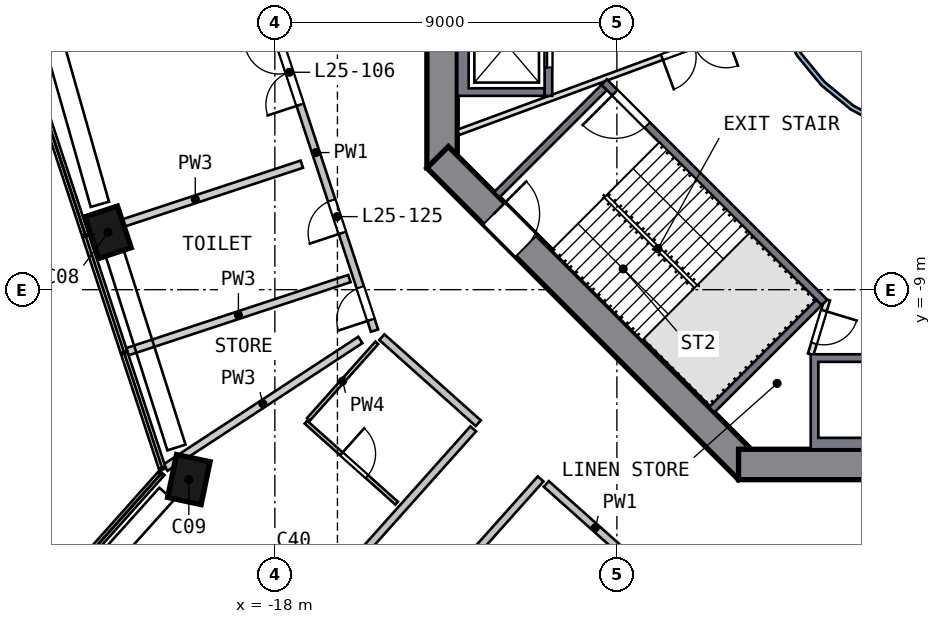
"""IFC4 building model, lengths in metres.
Left out: names, types, materials, properties, quantities, classifications, styles, units other than length and angle.
Written with IfcOpenShell. Run it as: python <this file> out.ifc"""

import sys

from ifc_helpers import new_model, si_unit, direction, frame, frame_2d, origin, origin_2d, place, context, subcontext, project, spatial, polyline, rectangle, outline, extrude, element, fill, save


model = new_model("IFC4")
c1 = context("Model", 3, precision=1e-05, world=origin(), true_north=direction((0.0, 1.0)))
c2 = subcontext(c1, "Body", "Model", "MODEL_VIEW")
j1 = project(units=[si_unit("LENGTHUNIT", "METRE"), si_unit("PLANEANGLEUNIT", "RADIAN")], contexts=[c1])
p1 = place(None, origin())
s1 = spatial("IfcSite", under=j1, at=p1, CompositionType="ELEMENT")
p2 = place(p1, origin())
s2 = spatial("IfcBuilding", under=s1, at=p2, CompositionType="ELEMENT")
p3 = place(p2, frame((0.0, 0.0, 107.0)))
s3 = spatial("IfcBuildingStorey", under=s2, at=p3, CompositionType="ELEMENT", Elevation=107.0)
p4 = place(p3, frame((-22.422, -7.389, 0.0), z_axis=(0.02809349, -0.08294545, 0.996158024), x_axis=(0.311587523, -0.946173645, -0.087570825)))
e1 = element("IfcColumn", 1, at=p4, inside=s3, PredefinedType="COLUMN", context=c2, shape_type="SweptSolid", body=[
    extrude(rectangle(XDim=1.15, YDim=0.9, at=origin_2d()), origin(), (0.0, 0.0, 1.0), 4.206),
])
p5 = place(p3, frame((-20.327, -13.907, 0.0), z_axis=(0.052164469, -0.074910267, 0.995824944), x_axis=(0.207629407, 0.97620516, 0.062558095)))
e2 = element("IfcColumn", 2, at=p5, inside=s3, PredefinedType="COLUMN", context=c2, shape_type="SweptSolid", body=[
    extrude(rectangle(XDim=1.15, YDim=0.9, at=origin_2d()), origin(), (0.0, 0.0, 1.0), 4.208),
])
p6 = place(p3, frame((-13.6, 5.799, 0.0), z_axis=(0.0, 0.0, 1.0), x_axis=(0.0, -1.0, 0.0)))
e3 = element("IfcWall", 3, at=p6, inside=s3, PredefinedType="SHEAR", context=c2, shape_type="SweptSolid", body=[
    extrude(rectangle(XDim=11.598, YDim=0.8, at=frame_2d((5.799, 0.0))), origin(), (0.0, 0.0, 1.0), 4.5),
])
p7 = place(p6, frame((4.899, 0.0, 0.0)))
e4 = element("IfcOpeningElement", 4, at=p7, cuts=e3, PredefinedType="OPENING", context=c2, shape_type="SweptSolid", body=[
    extrude(rectangle(XDim=1.8, YDim=2.1, at=frame_2d((0.9, 1.05))), frame((0.0, 0.41, 0.0), z_axis=(0.0, -1.0, 0.0), x_axis=(1.0, 0.0, 0.0)), (0.0, 0.0, 1.0), 0.82),
])
p8 = place(p3, frame((-13.717, -5.516, 0.0), z_axis=(0.0, 0.0, 1.0), x_axis=(0.707106781, -0.707106781, 0.0)))
e5 = element("IfcWall", 5, at=p8, inside=s3, PredefinedType="SHEAR", context=c2, shape_type="SweptSolid", body=[
    extrude(rectangle(XDim=11.598, YDim=0.8, at=frame_2d((5.799, 0.0))), origin(), (0.0, 0.0, 1.0), 4.5),
])
p9 = place(p8, frame((2.099, 0.0, 0.0)))
e6 = element("IfcOpeningElement", 6, at=p9, cuts=e5, PredefinedType="OPENING", context=c2, shape_type="SweptSolid", body=[
    extrude(rectangle(XDim=1.2, YDim=2.1, at=frame_2d((0.6, 1.05))), frame((0.0, 0.41, 0.0), z_axis=(0.0, -1.0, 0.0), x_axis=(1.0, 0.0, 0.0)), (0.0, 0.0, 1.0), 0.82),
])
p10 = place(p3, frame((-5.799, -13.6, 0.0), z_axis=(0.0, 0.0, 1.0), x_axis=(1.0, 0.0, 0.0)))
e7 = element("IfcWall", 7, at=p10, inside=s3, PredefinedType="SHEAR", context=c2, shape_type="SweptSolid", body=[
    extrude(rectangle(XDim=11.598, YDim=0.8, at=frame_2d((5.799, 0.0))), origin(), (0.0, 0.0, 1.0), 4.5),
])
p11 = place(p10, frame((4.899, 0.0, 0.0)))
e8 = element("IfcOpeningElement", 8, at=p11, cuts=e7, PredefinedType="OPENING", context=c2, shape_type="SweptSolid", body=[
    extrude(rectangle(XDim=1.8, YDim=2.1, at=frame_2d((0.9, 1.05))), frame((0.0, 0.41, 0.0), z_axis=(0.0, -1.0, 0.0), x_axis=(1.0, 0.0, 0.0)), (0.0, 0.0, 1.0), 0.82),
])
p12 = place(p3, origin())
e9 = element("IfcWall", 9, at=p12, inside=s3, PredefinedType="SOLIDWALL", context=c2, shape_type="SweptSolid", body=[
    extrude(outline(polyline([(-13.2, -3.9), (-13.2, -1.2), (-10.9, -1.2), (-10.9, -1.4), (-12.9, -1.4), (-12.9, -3.7), (-10.9, -3.7), (-10.9, -3.9), (-13.2, -3.9)])), origin(), (0.0, 0.0, 1.0), 4.19),
])
p13 = place(p3, frame((-10.8, -1.2, 0.0), z_axis=(0.0, 0.0, 1.0), x_axis=(0.0, -1.0, 0.0)))
e10 = element("IfcWall", 10, at=p13, inside=s3, PredefinedType="SOLIDWALL", context=c2, shape_type="SweptSolid", body=[
    extrude(rectangle(XDim=2.7, YDim=0.2, at=frame_2d((1.35, 0.0))), origin(), (0.0, 0.0, 1.0), 4.19),
])
p14 = place(p13, frame((0.75, 0.0, 0.0)))
e11 = element("IfcOpeningElement", 11, at=p14, cuts=e10, PredefinedType="OPENING", context=c2, shape_type="SweptSolid", body=[
    extrude(rectangle(XDim=1.2, YDim=2.1, at=frame_2d((0.6, 1.05))), frame((0.0, 0.11, 0.0), z_axis=(0.0, -1.0, 0.0), x_axis=(1.0, 0.0, 0.0)), (0.0, 0.0, 1.0), 0.22),
])
p15 = place(p3, origin())
e12 = element("IfcWall", 12, at=p15, inside=s3, PredefinedType="SOLIDWALL", context=c2, shape_type="SweptSolid", body=[
    extrude(outline(polyline([(-1.2, -13.2), (-3.9, -13.2), (-3.9, -10.7), (-1.2, -10.7), (-1.2, -13.2)]), holes=[polyline([(-3.7, -10.9), (-3.7, -12.9), (-1.4, -12.9), (-1.4, -10.9), (-3.7, -10.9)])]), origin(), (0.0, 0.0, 1.0), 4.19),
])
p16 = place(p3, frame((-3.535, -9.334, 0.0), z_axis=(0.0, 0.0, 1.0), x_axis=(-0.707106781, 0.707106781, 0.0)))
e13 = element("IfcWall", 13, at=p16, inside=s3, PredefinedType="SOLIDWALL", context=c2, shape_type="SweptSolid", body=[
    extrude(rectangle(XDim=8.2, YDim=0.2, at=frame_2d((4.1, 0.0))), origin(), (0.0, 0.0, 1.0), 4.19),
])
p17 = place(p16, frame((6.6, 0.0, 0.0)))
e14 = element("IfcOpeningElement", 14, at=p17, cuts=e13, PredefinedType="OPENING", context=c2, shape_type="SweptSolid", body=[
    extrude(rectangle(XDim=1.2, YDim=2.1, at=frame_2d((0.6, 1.05))), frame((0.0, 0.11, 0.0), z_axis=(0.0, -1.0, 0.0), x_axis=(1.0, 0.0, 0.0)), (0.0, 0.0, 1.0), 0.22),
])
for number, where, z_axis, x_axis in (
    (15, (-9.334, -3.677, 0.0), (0.0, 0.0, 1.0), (-0.707, -0.707, 0.0)),
    (16, (-3.677, -9.334, 0.0), (0.0, 0.0, 1.0), (-0.707, -0.707, 0.0)),
):
    element("IfcWall", number, at=place(p3, frame(where, z_axis=z_axis, x_axis=x_axis)), inside=s3, PredefinedType="SOLIDWALL", context=c2, shape_type="SweptSolid", body=[
        extrude(rectangle(XDim=4.0, YDim=0.2, at=frame_2d((2.0, 0.0))), origin(), (0.0, 0.0, 1.0), 4.19),
    ])
p18 = place(p3, frame((-3.465, -9.263, 0.0), z_axis=(0.0, 0.0, 1.0), x_axis=(-0.289808785, -0.957084567, 0.0)))
e17 = element("IfcWall", 17, at=p18, inside=s3, PredefinedType="PARTITIONING", context=c2, shape_type="SweptSolid", body=[
    extrude(rectangle(XDim=1.501, YDim=0.15, at=frame_2d((0.75, 0.0))), origin(), (0.0, 0.0, 1.0), 4.19),
])
p19 = place(p18, frame((0.301, 0.0, 0.0)))
e18 = element("IfcOpeningElement", 18, at=p19, cuts=e17, PredefinedType="OPENING", context=c2, shape_type="SweptSolid", body=[
    extrude(rectangle(XDim=0.9, YDim=2.1, at=frame_2d((0.45, 1.05))), frame((0.0, 0.085, 0.0), z_axis=(0.0, -1.0, 0.0), x_axis=(1.0, 0.0, 0.0)), (0.0, 0.0, 1.0), 0.17),
])
p20 = place(p3, frame((-4.813, -1.776, 0.0), z_axis=(0.0, 0.0, 1.0), x_axis=(-0.938191915, -0.346115488, 0.0)))
e19 = element("IfcWall", 19, at=p20, inside=s3, PredefinedType="PARTITIONING", context=c2, shape_type="SweptSolid", body=[
    extrude(rectangle(XDim=8.91, YDim=0.15, at=frame_2d((4.455, 0.0))), origin(), (0.0, 0.0, 1.0), 4.19),
])
p21 = place(p20, frame((1.4, 0.0, 0.0)))
e20 = element("IfcOpeningElement", 20, at=p21, cuts=e19, PredefinedType="OPENING", context=c2, shape_type="SweptSolid", body=[
    extrude(rectangle(XDim=1.8, YDim=2.1, at=frame_2d((0.9, 1.05))), frame((0.0, 0.085, 0.0), z_axis=(0.0, -1.0, 0.0), x_axis=(1.0, 0.0, 0.0)), (0.0, 0.0, 1.0), 0.17),
])
p22 = place(p3, origin())
e21 = element("IfcWall", 21, at=p22, inside=s3, PredefinedType="SOLIDWALL", context=c2, shape_type="SweptSolid", body=[
    extrude(outline(polyline([(5.021, -0.999), (4.73, -1.959), (4.257, -2.844), (3.62, -3.62), (2.844, -4.257), (1.959, -4.73), (0.999, -5.021), (0.0, -5.12), (-0.999, -5.021), (-1.959, -4.73), (-2.844, -4.257), (-3.62, -3.62), (-4.257, -2.844), (-4.73, -1.959), (-5.021, -0.999), (-5.12, 0.0), (-5.021, 0.999), (-4.73, 1.959), (-4.257, 2.844), (-3.62, 3.62), (-2.844, 4.257), (-1.959, 4.73), (-0.999, 5.021), (0.0, 5.12), (0.999, 5.021), (1.959, 4.73), (2.844, 4.257), (3.62, 3.62), (4.257, 2.844), (4.73, 1.959), (5.021, 0.999), (5.12, 0.0), (5.021, -0.999)]), holes=[polyline([(4.904, 0.976), (4.619, 1.913), (4.157, 2.778), (3.535, 3.535), (2.778, 4.157), (1.913, 4.619), (0.976, 4.904), (0.0, 5.0), (-0.976, 4.904), (-1.913, 4.619), (-2.778, 4.157), (-3.535, 3.535), (-4.157, 2.778), (-4.619, 1.913), (-4.904, 0.976), (-5.0, 0.0), (-4.904, -0.976), (-4.619, -1.913), (-4.157, -2.778), (-3.535, -3.535), (-2.778, -4.157), (-1.913, -4.619), (-0.976, -4.904), (0.0, -5.0), (0.976, -4.904), (1.913, -4.619), (2.778, -4.157), (3.535, -3.535), (4.157, -2.778), (4.619, -1.913), (4.904, -0.976), (5.0, 0.0), (4.904, 0.976)])]), origin(), (0.0, 0.0, 1.0), 4.19),
])
p23 = place(p3, frame((-23.687, -24.878, 0.0), z_axis=(0.0, 0.0, 1.0), x_axis=(0.666012214, 0.745940836, 0.0)))
e22 = element("IfcWall", 22, at=p23, inside=s3, PredefinedType="SOLIDWALL", context=c2, shape_type="SweptSolid", body=[
    extrude(rectangle(XDim=16.375, YDim=0.2, at=frame_2d((8.188, 0.0))), origin(), (0.0, 0.0, 1.0), 4.19),
])
p24 = place(p23, frame((8.5, 0.0, 0.0)))
e23 = element("IfcOpeningElement", 23, at=p24, cuts=e22, PredefinedType="OPENING", context=c2, shape_type="SweptSolid", body=[
    extrude(rectangle(XDim=1.0, YDim=2.1, at=frame_2d((0.5, 1.05))), frame((0.0, 0.11, 0.0), z_axis=(0.0, -1.0, 0.0), x_axis=(1.0, 0.0, 0.0)), (0.0, 0.0, 1.0), 0.22),
])
p25 = place(p3, frame((-15.377, -10.078, 0.0), z_axis=(0.0, 0.0, 1.0), x_axis=(-0.312993376, 0.949755309, 0.0)))
e24 = element("IfcWall", 24, at=p25, inside=s3, PredefinedType="SOLIDWALL", context=c2, shape_type="SweptSolid", body=[
    extrude(rectangle(XDim=9.516, YDim=0.2, at=frame_2d((4.758, 0.0))), origin(), (0.0, 0.0, 1.0), 4.19),
])
p26 = place(p25, frame((6.258, 0.0, 0.0)))
e25 = element("IfcOpeningElement", 25, at=p26, cuts=e24, PredefinedType="OPENING", context=c2, shape_type="SweptSolid", body=[
    extrude(rectangle(XDim=1.8, YDim=2.1, at=frame_2d((0.9, 1.05))), frame((0.0, 0.11, 0.0), z_axis=(0.0, -1.0, 0.0), x_axis=(1.0, 0.0, 0.0)), (0.0, 0.0, 1.0), 0.22),
])
p27 = place(p25, frame((2.708, 0.0, 0.0)))
e26 = element("IfcOpeningElement", 26, at=p27, cuts=e24, PredefinedType="OPENING", context=c2, shape_type="SweptSolid", body=[
    extrude(rectangle(XDim=0.9, YDim=2.1, at=frame_2d((0.45, 1.05))), frame((0.0, 0.11, 0.0), z_axis=(0.0, -1.0, 0.0), x_axis=(1.0, 0.0, 0.0)), (0.0, 0.0, 1.0), 0.22),
])
p28 = place(p25, frame((0.3, 0.0, 0.0)))
e27 = element("IfcOpeningElement", 27, at=p28, cuts=e24, PredefinedType="OPENING", context=c2, shape_type="SweptSolid", body=[
    extrude(rectangle(XDim=0.9, YDim=2.1, at=frame_2d((0.45, 1.05))), frame((0.0, 0.11, 0.0), z_axis=(0.0, -1.0, 0.0), x_axis=(1.0, 0.0, 0.0)), (0.0, 0.0, 1.0), 0.22),
])
p29 = place(p3, frame((-11.007, -13.979, 0.0), z_axis=(0.0, 0.0, 1.0), x_axis=(-0.666010793, -0.745942105, 0.0)))
e28 = element("IfcWall", 28, at=p29, inside=s3, PredefinedType="SOLIDWALL", context=c2, shape_type="SweptSolid", body=[
    extrude(rectangle(XDim=16.573, YDim=0.2, at=frame_2d((8.287, 0.0))), origin(), (0.0, 0.0, 1.0), 4.19),
])
p30 = place(p29, frame((4.15, 0.0, 0.0)))
e29 = element("IfcOpeningElement", 29, at=p30, cuts=e28, PredefinedType="OPENING", context=c2, shape_type="SweptSolid", body=[
    extrude(rectangle(XDim=1.8, YDim=2.1, at=frame_2d((0.9, 1.05))), frame((0.0, 0.11, 0.0), z_axis=(0.0, -1.0, 0.0), x_axis=(1.0, 0.0, 0.0)), (0.0, 0.0, 1.0), 0.22),
])
p31 = place(p3, frame((-15.184, -10.25, 0.0), z_axis=(0.0, 0.0, 1.0), x_axis=(0.745969511, -0.665980096, 0.0)))
e30 = element("IfcWall", 30, at=p31, inside=s3, PredefinedType="SOLIDWALL", context=c2, shape_type="SweptSolid", body=[
    extrude(rectangle(XDim=3.4, YDim=0.2, at=frame_2d((1.7, 0.0))), origin(), (0.0, 0.0, 1.0), 4.19),
])
p32 = place(p3, frame((-10.857, -14.113, 0.0), z_axis=(0.0, 0.0, 1.0), x_axis=(0.745935156, -0.666018575, 0.0)))
e31 = element("IfcWall", 31, at=p32, inside=s3, PredefinedType="SOLIDWALL", context=c2, shape_type="SweptSolid", body=[
    extrude(rectangle(XDim=3.458, YDim=0.2, at=frame_2d((1.729, 0.0))), origin(), (0.0, 0.0, 1.0), 4.19),
])
p33 = place(p3, frame((-17.115, -12.413, 0.0), z_axis=(0.0, 0.0, 1.0), x_axis=(0.666012176, 0.74594087, 0.0)))
e32 = element("IfcWall", 32, at=p33, inside=s3, PredefinedType="PARTITIONING", context=c2, shape_type="SweptSolid", body=[
    extrude(rectangle(XDim=2.7, YDim=0.1, at=frame_2d((1.35, 0.0))), origin(), (0.0, 0.0, 1.0), 4.19),
])
p34 = place(p3, frame((-17.182, -12.487, 0.0), z_axis=(0.0, 0.0, 1.0), x_axis=(0.745917356, -0.666038511, 0.0)))
e33 = element("IfcWall", 33, at=p34, inside=s3, PredefinedType="PARTITIONING", context=c2, shape_type="SweptSolid", body=[
    extrude(rectangle(XDim=3.2, YDim=0.1, at=frame_2d((1.6, 0.0))), origin(), (0.0, 0.0, 1.0), 4.19),
])
p35 = place(p34, frame((1.25, 0.0, 0.0)))
e34 = element("IfcOpeningElement", 34, at=p35, cuts=e33, PredefinedType="OPENING", context=c2, shape_type="SweptSolid", body=[
    extrude(rectangle(XDim=0.9, YDim=2.1, at=frame_2d((0.45, 1.05))), frame((0.0, 0.06, 0.0), z_axis=(0.0, -1.0, 0.0), x_axis=(1.0, 0.0, 0.0)), (0.0, 0.0, 1.0), 0.12),
])
p36 = place(p3, frame((-17.291, -5.698, 0.0), z_axis=(0.0, 0.0, 1.0), x_axis=(-0.949749078, -0.313012282, 0.0)))
e35 = element("IfcWall", 35, at=p36, inside=s3, PredefinedType="SOLIDWALL", context=c2, shape_type="SweptSolid", body=[
    extrude(rectangle(XDim=5.903, YDim=0.2, at=frame_2d((2.951, 0.0))), origin(), (0.0, 0.0, 1.0), 4.19),
])
p37 = place(p3, frame((-16.039, -8.708, 0.0), z_axis=(0.0, 0.0, 1.0), x_axis=(-0.949745777, -0.313022298, 0.0)))
e36 = element("IfcWall", 36, at=p37, inside=s3, PredefinedType="SOLIDWALL", context=c2, shape_type="SweptSolid", body=[
    extrude(rectangle(XDim=6.15, YDim=0.2, at=frame_2d((3.075, 0.0))), origin(), (0.0, 0.0, 1.0), 4.19),
])
p38 = place(p3, frame((-15.751, -10.323, 0.0), z_axis=(0.0, 0.0, 1.0), x_axis=(-0.836373641, -0.54815977, 0.0)))
e37 = element("IfcWall", 37, at=p38, inside=s3, PredefinedType="SOLIDWALL", context=c2, shape_type="SweptSolid", body=[
    extrude(rectangle(XDim=6.132, YDim=0.2, at=frame_2d((3.066, 0.0))), origin(), (0.0, 0.0, 1.0), 4.19),
])
p39 = place(p14, origin())
e38 = element("IfcDoor", 38, at=p39, inside=s3, OperationType="DOUBLE_DOOR_SLIDING", PredefinedType="DOOR", context=c2, shape_type="SweptSolid", body=[
    extrude(rectangle(XDim=1.2, YDim=2.1, at=frame_2d((0.6, 1.05))), frame((0.0, 0.025, 0.0), z_axis=(0.0, -1.0, 0.0), x_axis=(1.0, 0.0, 0.0)), (0.0, 0.0, 1.0), 0.05),
])
fill(e11, e38)
p40 = place(p17, origin())
e39 = element("IfcDoor", 39, at=p40, inside=s3, OperationType="SINGLE_SWING_RIGHT", PredefinedType="DOOR", context=c2, shape_type="SweptSolid", body=[
    extrude(rectangle(XDim=1.2, YDim=2.1, at=frame_2d((0.6, 1.05))), frame((0.0, 0.025, 0.0), z_axis=(0.0, -1.0, 0.0), x_axis=(1.0, 0.0, 0.0)), (0.0, 0.0, 1.0), 0.05),
])
fill(e14, e39)
p41 = place(p9, origin())
e40 = element("IfcDoor", 40, at=p41, inside=s3, OperationType="SINGLE_SWING_LEFT", PredefinedType="DOOR", context=c2, shape_type="SweptSolid", body=[
    extrude(rectangle(XDim=1.2, YDim=2.1, at=frame_2d((0.6, 1.05))), frame((0.0, 0.025, 0.0), z_axis=(0.0, -1.0, 0.0), x_axis=(1.0, 0.0, 0.0)), (0.0, 0.0, 1.0), 0.05),
])
fill(e6, e40)
p42 = place(p19, origin())
e41 = element("IfcDoor", 41, at=p42, inside=s3, OperationType="SINGLE_SWING_LEFT", PredefinedType="DOOR", context=c2, shape_type="SweptSolid", body=[
    extrude(rectangle(XDim=0.9, YDim=2.1, at=frame_2d((0.45, 1.05))), frame((0.0, 0.025, 0.0), z_axis=(0.0, -1.0, 0.0), x_axis=(1.0, 0.0, 0.0)), (0.0, 0.0, 1.0), 0.05),
])
fill(e18, e41)
p43 = place(p21, origin())
e42 = element("IfcDoor", 42, at=p43, inside=s3, OperationType="DOUBLE_DOOR_SINGLE_SWING", PredefinedType="DOOR", context=c2, shape_type="SweptSolid", body=[
    extrude(rectangle(XDim=1.8, YDim=2.1, at=frame_2d((0.9, 1.05))), frame((0.0, 0.025, 0.0), z_axis=(0.0, -1.0, 0.0), x_axis=(1.0, 0.0, 0.0)), (0.0, 0.0, 1.0), 0.05),
])
fill(e20, e42)
p44 = place(p26, origin())
e43 = element("IfcDoor", 43, at=p44, inside=s3, OperationType="DOUBLE_DOOR_SINGLE_SWING", PredefinedType="DOOR", context=c2, shape_type="SweptSolid", body=[
    extrude(rectangle(XDim=1.8, YDim=2.1, at=frame_2d((0.9, 1.05))), frame((0.0, 0.025, 0.0), z_axis=(0.0, -1.0, 0.0), x_axis=(1.0, 0.0, 0.0)), (0.0, 0.0, 1.0), 0.05),
])
fill(e25, e43)
p45 = place(p35, origin())
e44 = element("IfcDoor", 44, at=p45, inside=s3, OperationType="SINGLE_SWING_LEFT", PredefinedType="DOOR", context=c2, shape_type="SweptSolid", body=[
    extrude(rectangle(XDim=0.9, YDim=2.1, at=frame_2d((0.45, 1.05))), frame((0.0, 0.025, 0.0), z_axis=(0.0, -1.0, 0.0), x_axis=(1.0, 0.0, 0.0)), (0.0, 0.0, 1.0), 0.05),
])
fill(e34, e44)
p46 = place(p27, origin())
e45 = element("IfcDoor", 45, at=p46, inside=s3, OperationType="SINGLE_SWING_LEFT", PredefinedType="DOOR", context=c2, shape_type="SweptSolid", body=[
    extrude(rectangle(XDim=0.9, YDim=2.1, at=frame_2d((0.45, 1.05))), frame((0.0, 0.025, 0.0), z_axis=(0.0, -1.0, 0.0), x_axis=(1.0, 0.0, 0.0)), (0.0, 0.0, 1.0), 0.05),
])
fill(e26, e45)
p47 = place(p28, origin())
e46 = element("IfcDoor", 46, at=p47, inside=s3, OperationType="SINGLE_SWING_LEFT", PredefinedType="DOOR", context=c2, shape_type="SweptSolid", body=[
    extrude(rectangle(XDim=0.9, YDim=2.1, at=frame_2d((0.45, 1.05))), frame((0.0, 0.025, 0.0), z_axis=(0.0, -1.0, 0.0), x_axis=(1.0, 0.0, 0.0)), (0.0, 0.0, 1.0), 0.05),
])
fill(e27, e46)
save(model, sys.argv[1])
